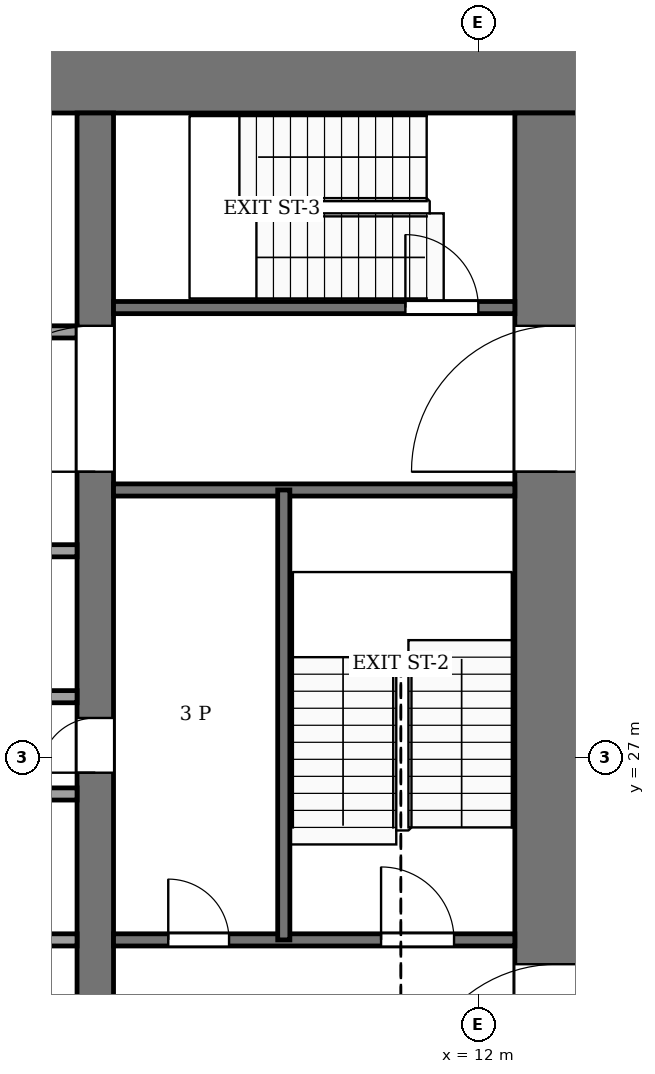
"""IFC4 building model, lengths in metres.
Left out: names, types, materials, properties, quantities, classifications, styles, units other than length and angle.
Written with IfcOpenShell. Run it as: python <this file> out.ifc"""

import sys

from ifc_helpers import new_model, si_unit, direction, frame, frame_2d, origin, place, context, subcontext, project, spatial, rectangle, extrude, element, fill, save


model = new_model("IFC4")
c1 = context("Model", 3, precision=1e-05, world=origin(), true_north=direction((0.0, 1.0)))
c2 = subcontext(c1, "Body", "Model", "MODEL_VIEW")
j1 = project(units=[si_unit("LENGTHUNIT", "METRE"), si_unit("PLANEANGLEUNIT", "RADIAN")], contexts=[c1])
p1 = place(None, origin())
s1 = spatial("IfcSite", under=j1, at=p1, CompositionType="ELEMENT")
p2 = place(p1, origin())
s2 = spatial("IfcBuilding", under=s1, at=p2, CompositionType="ELEMENT")
p3 = place(p2, frame((0.0, 0.0, 34.0)))
s3 = spatial("IfcBuildingStorey", under=s2, at=p3, CompositionType="ELEMENT", Elevation=34.0)
p4 = place(p3, frame((-14.0, 38.3, -0.13), z_axis=(0.0, 0.0, 1.0), x_axis=(1.0, 0.0, 0.0)))
e1 = element("IfcWall", 1, at=p4, inside=s3, PredefinedType="SHEAR", context=c2, shape_type="SweptSolid", body=[
    extrude(rectangle(XDim=28.0, YDim=1.4, at=frame_2d((14.0, 0.0))), origin(), (0.0, 0.0, 1.0), 4.0),
])
p5 = place(p3, frame((13.3, 18.4, -0.13), z_axis=(0.0, 0.0, 1.0), x_axis=(0.0, 1.0, 0.0)))
e2 = element("IfcWall", 2, at=p5, inside=s3, PredefinedType="SHEAR", context=c2, shape_type="SweptSolid", body=[
    extrude(rectangle(XDim=19.2, YDim=1.4, at=frame_2d((9.6, 0.0))), origin(), (0.0, 0.0, 1.0), 4.0),
])
p6 = place(p5, frame((2.8, 0.0, 0.13)))
e3 = element("IfcOpeningElement", 3, at=p6, cuts=e2, PredefinedType="OPENING", context=c2, shape_type="SweptSolid", body=[
    extrude(rectangle(XDim=2.4, YDim=2.4, at=frame_2d((1.2, 1.2))), frame((0.0, 0.71, 0.0), z_axis=(0.0, -1.0, 0.0), x_axis=(1.0, 0.0, 0.0)), (0.0, 0.0, 1.0), 1.42),
])
p7 = place(p5, frame((13.3, 0.0, 0.13)))
e4 = element("IfcOpeningElement", 4, at=p7, cuts=e2, PredefinedType="OPENING", context=c2, shape_type="SweptSolid", body=[
    extrude(rectangle(XDim=2.4, YDim=2.4, at=frame_2d((1.2, 1.2))), frame((0.0, 0.71, 0.0), z_axis=(0.0, -1.0, 0.0), x_axis=(1.0, 0.0, 0.0)), (0.0, 0.0, 1.0), 1.42),
])
p8 = place(p3, frame((5.7, 18.4, -0.13), z_axis=(0.0, 0.0, 1.0), x_axis=(0.0, 1.0, 0.0)))
e5 = element("IfcWall", 5, at=p8, inside=s3, PredefinedType="SHEAR", context=c2, shape_type="SweptSolid", body=[
    extrude(rectangle(XDim=19.2, YDim=0.6, at=frame_2d((9.6, 0.0))), origin(), (0.0, 0.0, 1.0), 4.0),
])
p9 = place(p8, frame((8.35, 0.0, 0.13)))
e6 = element("IfcOpeningElement", 6, at=p9, cuts=e5, PredefinedType="OPENING", context=c2, shape_type="SweptSolid", body=[
    extrude(rectangle(XDim=0.9, YDim=2.1, at=frame_2d((0.45, 1.05))), frame((0.0, 0.31, 0.0), z_axis=(0.0, -1.0, 0.0), x_axis=(1.0, 0.0, 0.0)), (0.0, 0.0, 1.0), 0.62),
])
p10 = place(p8, frame((13.3, 0.0, 0.13)))
e7 = element("IfcOpeningElement", 7, at=p10, cuts=e5, PredefinedType="OPENING", context=c2, shape_type="SweptSolid", body=[
    extrude(rectangle(XDim=2.4, YDim=2.4, at=frame_2d((1.2, 1.2))), frame((0.0, 0.31, 0.0), z_axis=(0.0, -1.0, 0.0), x_axis=(1.0, 0.0, 0.0)), (0.0, 0.0, 1.0), 0.62),
])
p11 = place(p3, frame((-5.4, 24.0, 0.0), z_axis=(0.0, 0.0, 1.0), x_axis=(1.0, 0.0, 0.0)))
e8 = element("IfcWall", 8, at=p11, inside=s3, PredefinedType="PARTITIONING", context=c2, shape_type="SweptSolid", body=[
    extrude(rectangle(XDim=10.8, YDim=0.2, at=frame_2d((5.4, 0.0))), origin(), (0.0, 0.0, 1.0), 3.87),
])
p12 = place(p11, frame((0.75, 0.0, 0.0)))
e9 = element("IfcOpeningElement", 9, at=p12, cuts=e8, PredefinedType="OPENING", context=c2, shape_type="SweptSolid", body=[
    extrude(rectangle(XDim=1.2, YDim=2.2, at=frame_2d((0.6, 1.1))), frame((0.0, 0.11, 0.0), z_axis=(0.0, -1.0, 0.0), x_axis=(1.0, 0.0, 0.0)), (0.0, 0.0, 1.0), 0.22),
])
p13 = place(p11, frame((3.45, 0.0, 0.0)))
e10 = element("IfcOpeningElement", 10, at=p13, cuts=e8, PredefinedType="OPENING", context=c2, shape_type="SweptSolid", body=[
    extrude(rectangle(XDim=1.2, YDim=2.2, at=frame_2d((0.6, 1.1))), frame((0.0, 0.11, 0.0), z_axis=(0.0, -1.0, 0.0), x_axis=(1.0, 0.0, 0.0)), (0.0, 0.0, 1.0), 0.22),
])
p14 = place(p11, frame((6.15, 0.0, 0.0)))
e11 = element("IfcOpeningElement", 11, at=p14, cuts=e8, PredefinedType="OPENING", context=c2, shape_type="SweptSolid", body=[
    extrude(rectangle(XDim=1.2, YDim=2.2, at=frame_2d((0.6, 1.1))), frame((0.0, 0.11, 0.0), z_axis=(0.0, -1.0, 0.0), x_axis=(1.0, 0.0, 0.0)), (0.0, 0.0, 1.0), 0.22),
])
p15 = place(p11, frame((8.85, 0.0, 0.0)))
e12 = element("IfcOpeningElement", 12, at=p15, cuts=e8, PredefinedType="OPENING", context=c2, shape_type="SweptSolid", body=[
    extrude(rectangle(XDim=1.2, YDim=2.2, at=frame_2d((0.6, 1.1))), frame((0.0, 0.11, 0.0), z_axis=(0.0, -1.0, 0.0), x_axis=(1.0, 0.0, 0.0)), (0.0, 0.0, 1.0), 0.22),
])
p16 = place(p3, frame((6.0, 24.0, 0.0), z_axis=(0.0, 0.0, 1.0), x_axis=(1.0, 0.0, 0.0)))
e13 = element("IfcWall", 13, at=p16, inside=s3, PredefinedType="PARTITIONING", context=c2, shape_type="SweptSolid", body=[
    extrude(rectangle(XDim=6.6, YDim=0.2, at=frame_2d((3.3, 0.0))), origin(), (0.0, 0.0, 1.0), 3.87),
])
p17 = place(p16, frame((0.9, 0.0, 0.0)))
e14 = element("IfcOpeningElement", 14, at=p17, cuts=e13, PredefinedType="OPENING", context=c2, shape_type="SweptSolid", body=[
    extrude(rectangle(XDim=1.0, YDim=2.1, at=frame_2d((0.5, 1.05))), frame((0.0, 0.11, 0.0), z_axis=(0.0, -1.0, 0.0), x_axis=(1.0, 0.0, 0.0)), (0.0, 0.0, 1.0), 0.22),
])
p18 = place(p16, frame((4.4, 0.0, 0.0)))
e15 = element("IfcOpeningElement", 15, at=p18, cuts=e13, PredefinedType="OPENING", context=c2, shape_type="SweptSolid", body=[
    extrude(rectangle(XDim=1.2, YDim=2.2, at=frame_2d((0.6, 1.1))), frame((0.0, 0.11, 0.0), z_axis=(0.0, -1.0, 0.0), x_axis=(1.0, 0.0, 0.0)), (0.0, 0.0, 1.0), 0.22),
])
for number, where, z_axis, x_axis in (
    (16, (-5.4, 26.4, 0.0), (0.0, 0.0, 1.0), (1.0, 0.0, 0.0)),
    (17, (-5.4, 28.0, 0.0), (0.0, 0.0, 1.0), (1.0, 0.0, 0.0)),
    (18, (-5.4, 30.4, 0.0), (0.0, 0.0, 1.0), (1.0, 0.0, 0.0)),
):
    element("IfcWall", number, at=place(p3, frame(where, z_axis=z_axis, x_axis=x_axis)), inside=s3, PredefinedType="PARTITIONING", context=c2, shape_type="SweptSolid", body=[
        extrude(rectangle(XDim=10.8, YDim=0.2, at=frame_2d((5.4, 0.0))), origin(), (0.0, 0.0, 1.0), 3.87),
    ])
p19 = place(p3, frame((6.0, 31.4, 0.0), z_axis=(0.0, 0.0, 1.0), x_axis=(1.0, 0.0, 0.0)))
e19 = element("IfcWall", 19, at=p19, inside=s3, PredefinedType="PARTITIONING", context=c2, shape_type="SweptSolid", body=[
    extrude(rectangle(XDim=6.6, YDim=0.2, at=frame_2d((3.3, 0.0))), origin(), (0.0, 0.0, 1.0), 3.87),
])
p20 = place(p3, frame((-5.4, 34.0, 0.0), z_axis=(0.0, 0.0, 1.0), x_axis=(1.0, 0.0, 0.0)))
e20 = element("IfcWall", 20, at=p20, inside=s3, PredefinedType="PARTITIONING", context=c2, shape_type="SweptSolid", body=[
    extrude(rectangle(XDim=10.8, YDim=0.2, at=frame_2d((5.4, 0.0))), origin(), (0.0, 0.0, 1.0), 3.87),
])
p21 = place(p20, frame((6.15, 0.0, 0.0)))
e21 = element("IfcOpeningElement", 21, at=p21, cuts=e20, PredefinedType="OPENING", context=c2, shape_type="SweptSolid", body=[
    extrude(rectangle(XDim=1.2, YDim=2.2, at=frame_2d((0.6, 1.1))), frame((0.0, 0.11, 0.0), z_axis=(0.0, -1.0, 0.0), x_axis=(1.0, 0.0, 0.0)), (0.0, 0.0, 1.0), 0.22),
])
p22 = place(p20, frame((8.95, 0.0, 0.0)))
e22 = element("IfcOpeningElement", 22, at=p22, cuts=e20, PredefinedType="OPENING", context=c2, shape_type="SweptSolid", body=[
    extrude(rectangle(XDim=1.0, YDim=2.1, at=frame_2d((0.5, 1.05))), frame((0.0, 0.11, 0.0), z_axis=(0.0, -1.0, 0.0), x_axis=(1.0, 0.0, 0.0)), (0.0, 0.0, 1.0), 0.22),
])
p23 = place(p3, frame((6.0, 34.4, 0.0), z_axis=(0.0, 0.0, 1.0), x_axis=(1.0, 0.0, 0.0)))
e23 = element("IfcWall", 23, at=p23, inside=s3, PredefinedType="PARTITIONING", context=c2, shape_type="SweptSolid", body=[
    extrude(rectangle(XDim=6.6, YDim=0.2, at=frame_2d((3.3, 0.0))), origin(), (0.0, 0.0, 1.0), 3.87),
])
p24 = place(p23, frame((4.8, 0.0, 0.0)))
e24 = element("IfcOpeningElement", 24, at=p24, cuts=e23, PredefinedType="OPENING", context=c2, shape_type="SweptSolid", body=[
    extrude(rectangle(XDim=1.2, YDim=2.2, at=frame_2d((0.6, 1.1))), frame((0.0, 0.11, 0.0), z_axis=(0.0, -1.0, 0.0), x_axis=(1.0, 0.0, 0.0)), (0.0, 0.0, 1.0), 0.22),
])
p25 = place(p3, frame((8.8, 24.0, 0.0), z_axis=(0.0, 0.0, 1.0), x_axis=(0.0, 1.0, 0.0)))
e25 = element("IfcWall", 25, at=p25, inside=s3, PredefinedType="PARTITIONING", context=c2, shape_type="SweptSolid", body=[
    extrude(rectangle(XDim=7.4, YDim=0.2, at=frame_2d((3.7, 0.0))), origin(), (0.0, 0.0, 1.0), 3.87),
])
p26 = place(p17, origin())
e26 = element("IfcDoor", 26, at=p26, inside=s3, OperationType="SINGLE_SWING_RIGHT", PredefinedType="DOOR", context=c2, shape_type="SweptSolid", body=[
    extrude(rectangle(XDim=1.0, YDim=2.1, at=frame_2d((0.5, 1.05))), frame((0.0, 0.025, 0.0), z_axis=(0.0, -1.0, 0.0), x_axis=(1.0, 0.0, 0.0)), (0.0, 0.0, 1.0), 0.05),
])
fill(e14, e26)
p27 = place(p9, origin())
e27 = element("IfcDoor", 27, at=p27, inside=s3, OperationType="SINGLE_SWING_RIGHT", PredefinedType="DOOR", context=c2, shape_type="SweptSolid", body=[
    extrude(rectangle(XDim=0.9, YDim=2.1, at=frame_2d((0.45, 1.05))), frame((0.0, 0.025, 0.0), z_axis=(0.0, -1.0, 0.0), x_axis=(1.0, 0.0, 0.0)), (0.0, 0.0, 1.0), 0.05),
])
fill(e6, e27)
p28 = place(p18, origin())
e28 = element("IfcDoor", 28, at=p28, inside=s3, OperationType="SINGLE_SWING_LEFT", PredefinedType="DOOR", context=c2, shape_type="SweptSolid", body=[
    extrude(rectangle(XDim=1.2, YDim=2.2, at=frame_2d((0.6, 1.1))), frame((0.0, 0.025, 0.0), z_axis=(0.0, -1.0, 0.0), x_axis=(1.0, 0.0, 0.0)), (0.0, 0.0, 1.0), 0.05),
])
fill(e15, e28)
p29 = place(p24, origin())
e29 = element("IfcDoor", 29, at=p29, inside=s3, OperationType="SINGLE_SWING_RIGHT", PredefinedType="DOOR", context=c2, shape_type="SweptSolid", body=[
    extrude(rectangle(XDim=1.2, YDim=2.2, at=frame_2d((0.6, 1.1))), frame((0.0, 0.025, 0.0), z_axis=(0.0, -1.0, 0.0), x_axis=(1.0, 0.0, 0.0)), (0.0, 0.0, 1.0), 0.05),
])
fill(e24, e29)
p30 = place(p10, origin())
e30 = element("IfcDoor", 30, at=p30, inside=s3, OperationType="DOUBLE_DOOR_SINGLE_SWING", PredefinedType="DOOR", context=c2, shape_type="SweptSolid", body=[
    extrude(rectangle(XDim=2.4, YDim=2.4, at=frame_2d((1.2, 1.2))), frame((0.0, 0.025, 0.0), z_axis=(0.0, -1.0, 0.0), x_axis=(1.0, 0.0, 0.0)), (0.0, 0.0, 1.0), 0.05),
])
fill(e7, e30)
p31 = place(p6, origin())
e31 = element("IfcDoor", 31, at=p31, inside=s3, OperationType="DOUBLE_DOOR_SINGLE_SWING", PredefinedType="DOOR", context=c2, shape_type="SweptSolid", body=[
    extrude(rectangle(XDim=2.4, YDim=2.4, at=frame_2d((1.2, 1.2))), frame((0.0, 0.025, 0.0), z_axis=(0.0, -1.0, 0.0), x_axis=(1.0, 0.0, 0.0)), (0.0, 0.0, 1.0), 0.05),
])
fill(e3, e31)
p32 = place(p7, origin())
e32 = element("IfcDoor", 32, at=p32, inside=s3, OperationType="DOUBLE_DOOR_SINGLE_SWING", PredefinedType="DOOR", context=c2, shape_type="SweptSolid", body=[
    extrude(rectangle(XDim=2.4, YDim=2.4, at=frame_2d((1.2, 1.2))), frame((0.0, 0.025, 0.0), z_axis=(0.0, -1.0, 0.0), x_axis=(1.0, 0.0, 0.0)), (0.0, 0.0, 1.0), 0.05),
])
fill(e4, e32)
save(model, sys.argv[1])
